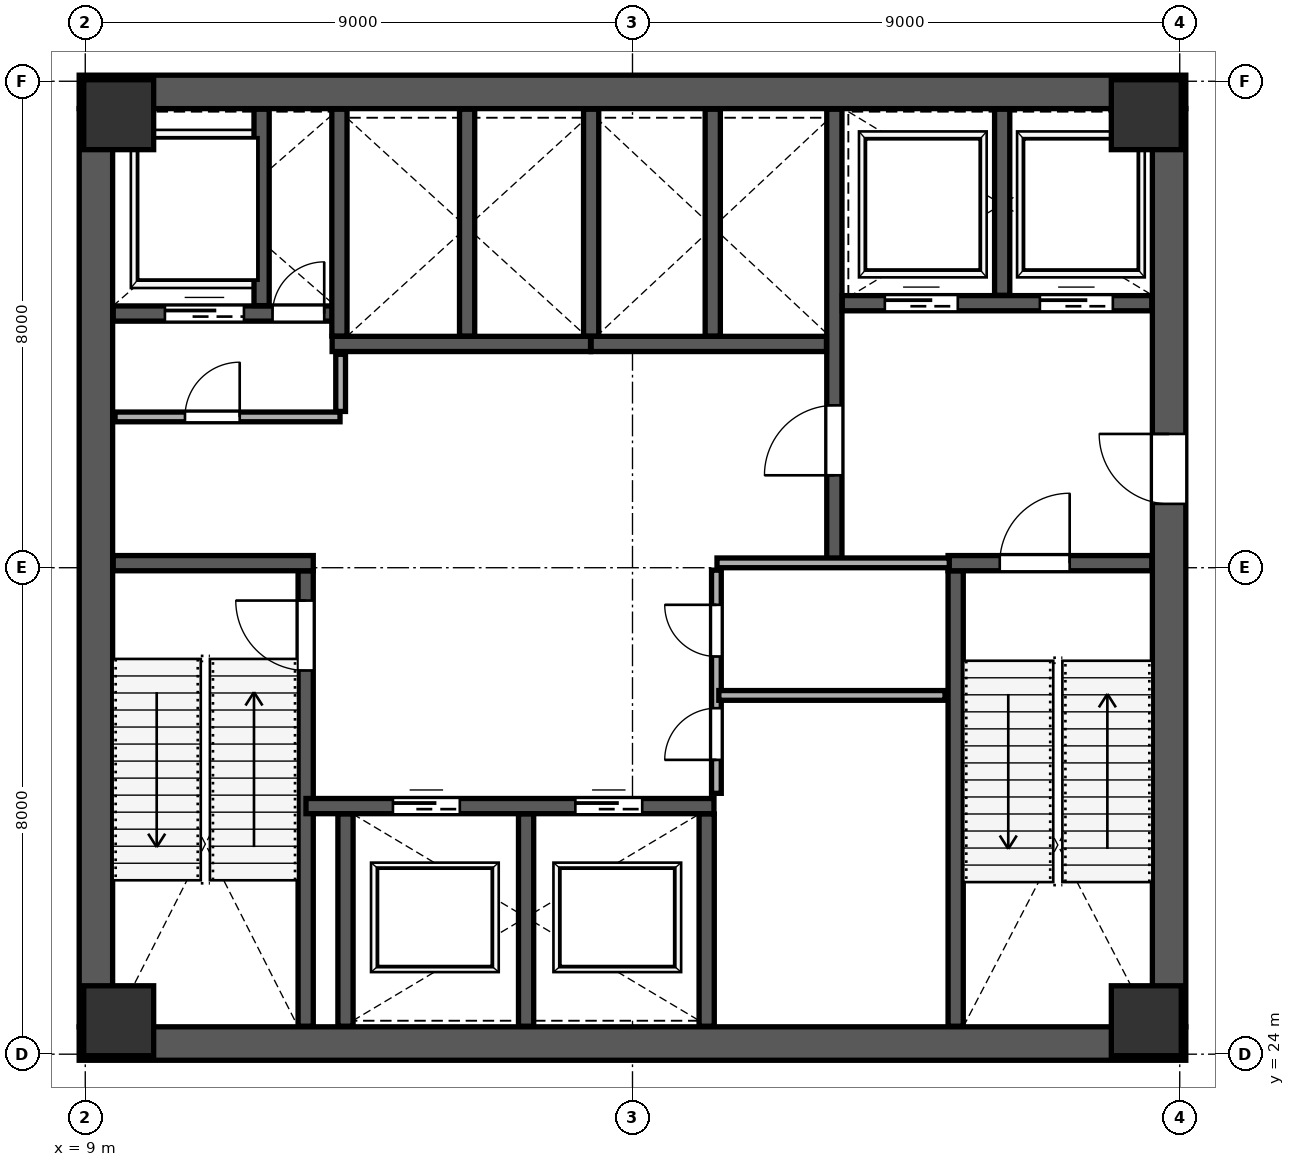
"""IFC4 building model, lengths in metres.
Left out: names, types, materials, properties, quantities, classifications, styles, units other than length and angle.
Written with IfcOpenShell. Run it as: python <this file> out.ifc"""

import sys

from ifc_helpers import new_model, si_unit, direction, frame, frame_2d, origin, origin_2d, place, context, subcontext, project, spatial, rectangle, extrude, source, transform, mapped, element, fill, save


model = new_model("IFC4")
c1 = context("Model", 3, precision=1e-05, world=origin(), true_north=direction((0.0, 1.0)))
c2 = subcontext(c1, "Body", "Model", "MODEL_VIEW")
j1 = project(units=[si_unit("LENGTHUNIT", "METRE"), si_unit("PLANEANGLEUNIT", "RADIAN")], contexts=[c1])
p1 = place(None, origin())
s1 = spatial("IfcSite", under=j1, at=p1, CompositionType="ELEMENT")
p2 = place(p1, origin())
s2 = spatial("IfcBuilding", under=s1, at=p2, CompositionType="ELEMENT")
p3 = place(p2, frame((0.0, 0.0, 52.0)))
s3 = spatial("IfcBuildingStorey", under=s2, at=p3, CompositionType="ELEMENT", Elevation=52.0)
m1 = source(origin(), c2, "Body", "SweptSolid", [
    extrude(rectangle(XDim=1.15, YDim=1.15, at=origin_2d()), origin(), (0.0, 0.0, 1.0), 4.799),
])
for number, where, z_axis, x_axis in (
    (1, (9.55, 24.55, 0.001), (0.0, 0.0, 1.0), (1.0, 0.0, 0.0)),
    (2, (26.45, 24.55, 0.001), (0.0, 0.0, 1.0), (1.0, 0.0, 0.0)),
    (3, (9.55, 39.45, 0.001), (0.0, 0.0, 1.0), (1.0, 0.0, 0.0)),
    (4, (26.45, 39.45, 0.001), (0.0, 0.0, 1.0), (1.0, 0.0, 0.0)),
):
    element("IfcColumn", number, at=place(p3, frame(where, z_axis=z_axis, x_axis=x_axis)), inside=s3, PredefinedType="COLUMN", context=c2, shape_type="MappedRepresentation", body=[
        mapped(m1, transform((0.0, 0.0, 0.0), scale=1.0)),
    ])
p4 = place(p3, frame((9.175, 24.45, 0.0), z_axis=(0.0, 0.0, 1.0), x_axis=(0.0, 1.0, 0.0)))
e5 = element("IfcWall", 5, at=p4, inside=s3, PredefinedType="SHEAR", context=c2, shape_type="SweptSolid", body=[
    extrude(rectangle(XDim=15.1, YDim=0.55, at=frame_2d((7.55, 0.0))), origin(), (0.0, 0.0, 1.0), 4.56),
])
p5 = place(p3, frame((26.825, 24.45, 0.0), z_axis=(0.0, 0.0, 1.0), x_axis=(0.0, 1.0, 0.0)))
e6 = element("IfcWall", 6, at=p5, inside=s3, PredefinedType="SHEAR", context=c2, shape_type="SweptSolid", body=[
    extrude(rectangle(XDim=15.1, YDim=0.55, at=frame_2d((7.55, 0.0))), origin(), (0.0, 0.0, 1.0), 4.56),
])
p6 = place(p5, frame((8.6, 0.0, 0.0)))
e7 = element("IfcOpeningElement", 7, at=p6, cuts=e6, PredefinedType="OPENING", context=c2, shape_type="SweptSolid", body=[
    extrude(rectangle(XDim=1.15, YDim=2.2, at=frame_2d((0.575, 1.1))), frame((0.0, 0.285, 0.0), z_axis=(0.0, -1.0, 0.0), x_axis=(1.0, 0.0, 0.0)), (0.0, 0.0, 1.0), 0.57),
])
for number, where, z_axis, x_axis in (
    (8, (8.9, 24.175, 0.0), (0.0, 0.0, 1.0), (1.0, 0.0, 0.0)),
    (9, (8.9, 39.825, 0.0), (0.0, 0.0, 1.0), (1.0, 0.0, 0.0)),
):
    element("IfcWall", number, at=place(p3, frame(where, z_axis=z_axis, x_axis=x_axis)), inside=s3, PredefinedType="SHEAR", context=c2, shape_type="SweptSolid", body=[
        extrude(rectangle(XDim=18.2, YDim=0.55, at=frame_2d((9.1, 0.0))), origin(), (0.0, 0.0, 1.0), 4.56),
    ])
p7 = place(p3, frame((12.625, 24.46, 0.0), z_axis=(0.0, 0.0, 1.0), x_axis=(0.0, 1.0, 0.0)))
e10 = element("IfcWall", 10, at=p7, inside=s3, PredefinedType="SHEAR", context=c2, shape_type="SweptSolid", body=[
    extrude(rectangle(XDim=7.49, YDim=0.25, at=frame_2d((3.745, 0.0))), origin(), (0.0, 0.0, 1.0), 4.56),
])
p8 = place(p7, frame((5.85, 0.0, 0.0)))
e11 = element("IfcOpeningElement", 11, at=p8, cuts=e10, PredefinedType="OPENING", context=c2, shape_type="SweptSolid", body=[
    extrude(rectangle(XDim=1.15, YDim=2.2, at=frame_2d((0.575, 1.1))), frame((0.0, 0.135, 0.0), z_axis=(0.0, -1.0, 0.0), x_axis=(1.0, 0.0, 0.0)), (0.0, 0.0, 1.0), 0.27),
])
p9 = place(p3, frame((9.46, 32.075, 0.0), z_axis=(0.0, 0.0, 1.0), x_axis=(1.0, 0.0, 0.0)))
e12 = element("IfcWall", 12, at=p9, inside=s3, PredefinedType="SHEAR", context=c2, shape_type="SweptSolid", body=[
    extrude(rectangle(XDim=3.29, YDim=0.25, at=frame_2d((1.645, 0.0))), origin(), (0.0, 0.0, 1.0), 4.56),
])
p10 = place(p3, frame((23.315, 24.46, 0.0), z_axis=(0.0, 0.0, 1.0), x_axis=(0.0, 1.0, 0.0)))
e13 = element("IfcWall", 13, at=p10, inside=s3, PredefinedType="SHEAR", context=c2, shape_type="SweptSolid", body=[
    extrude(rectangle(XDim=7.49, YDim=0.25, at=frame_2d((3.745, 0.0))), origin(), (0.0, 0.0, 1.0), 4.56),
])
p11 = place(p3, frame((23.19, 32.075, 0.0), z_axis=(0.0, 0.0, 1.0), x_axis=(1.0, 0.0, 0.0)))
e14 = element("IfcWall", 14, at=p11, inside=s3, PredefinedType="SHEAR", context=c2, shape_type="SweptSolid", body=[
    extrude(rectangle(XDim=3.35, YDim=0.25, at=frame_2d((1.675, 0.0))), origin(), (0.0, 0.0, 1.0), 4.56),
])
p12 = place(p11, frame((0.85, 0.0, 0.0)))
e15 = element("IfcOpeningElement", 15, at=p12, cuts=e14, PredefinedType="OPENING", context=c2, shape_type="SweptSolid", body=[
    extrude(rectangle(XDim=1.15, YDim=2.2, at=frame_2d((0.575, 1.1))), frame((0.0, 0.135, 0.0), z_axis=(0.0, -1.0, 0.0), x_axis=(1.0, 0.0, 0.0)), (0.0, 0.0, 1.0), 0.27),
])
p13 = place(p3, frame((21.32, 32.12, 0.0), z_axis=(0.0, 0.0, 1.0), x_axis=(0.0, 1.0, 0.0)))
e16 = element("IfcWall", 16, at=p13, inside=s3, PredefinedType="SHEAR", context=c2, shape_type="SweptSolid", body=[
    extrude(rectangle(XDim=7.42, YDim=0.25, at=frame_2d((3.71, 0.0))), origin(), (0.0, 0.0, 1.0), 4.56),
])
p14 = place(p13, frame((1.4, 0.0, 0.0)))
e17 = element("IfcOpeningElement", 17, at=p14, cuts=e16, PredefinedType="OPENING", context=c2, shape_type="SweptSolid", body=[
    extrude(rectangle(XDim=1.15, YDim=2.2, at=frame_2d((0.575, 1.1))), frame((0.0, 0.135, 0.0), z_axis=(0.0, -1.0, 0.0), x_axis=(1.0, 0.0, 0.0)), (0.0, 0.0, 1.0), 0.27),
])
p15 = place(p3, frame((9.46, 36.18, 0.0), z_axis=(0.0, 0.0, 1.0), x_axis=(1.0, 0.0, 0.0)))
e18 = element("IfcWall", 18, at=p15, inside=s3, PredefinedType="SHEAR", context=c2, shape_type="SweptSolid", body=[
    extrude(rectangle(XDim=3.79, YDim=0.25, at=frame_2d((1.895, 0.0))), origin(), (0.0, 0.0, 1.0), 4.56),
])
p16 = place(p15, frame((2.62, 0.0, 0.0)))
e19 = element("IfcOpeningElement", 19, at=p16, cuts=e18, PredefinedType="OPENING", context=c2, shape_type="SweptSolid", body=[
    extrude(rectangle(XDim=0.85, YDim=2.1, at=frame_2d((0.425, 1.05))), frame((0.0, 0.135, 0.0), z_axis=(0.0, -1.0, 0.0), x_axis=(1.0, 0.0, 0.0)), (0.0, 0.0, 1.0), 0.27),
])
p17 = place(p15, frame((0.85, 0.0, 0.0)))
e20 = element("IfcOpeningElement", 20, at=p17, cuts=e18, PredefinedType="OPENING", context=c2, shape_type="SweptSolid", body=[
    extrude(rectangle(XDim=1.3, YDim=2.25, at=frame_2d((0.65, 1.125))), frame((0.0, 0.135, 0.0), z_axis=(0.0, -1.0, 0.0), x_axis=(1.0, 0.0, 0.0)), (0.0, 0.0, 1.0), 0.27),
])
p18 = place(p3, frame((11.9, 36.31, 0.0), z_axis=(0.0, 0.0, 1.0), x_axis=(0.0, 1.0, 0.0)))
e21 = element("IfcWall", 21, at=p18, inside=s3, PredefinedType="SHEAR", context=c2, shape_type="SweptSolid", body=[
    extrude(rectangle(XDim=3.23, YDim=0.25, at=frame_2d((1.615, 0.0))), origin(), (0.0, 0.0, 1.0), 4.56),
])
p19 = place(p3, frame((21.45, 36.35, 0.0), z_axis=(0.0, 0.0, 1.0), x_axis=(1.0, 0.0, 0.0)))
e22 = element("IfcWall", 22, at=p19, inside=s3, PredefinedType="SHEAR", context=c2, shape_type="SweptSolid", body=[
    extrude(rectangle(XDim=5.09, YDim=0.25, at=frame_2d((2.545, 0.0))), origin(), (0.0, 0.0, 1.0), 4.56),
])
p20 = place(p19, frame((0.7, 0.0, 0.0)))
e23 = element("IfcOpeningElement", 23, at=p20, cuts=e22, PredefinedType="OPENING", context=c2, shape_type="SweptSolid", body=[
    extrude(rectangle(XDim=1.2, YDim=2.2, at=frame_2d((0.6, 1.1))), frame((0.0, 0.135, 0.0), z_axis=(0.0, -1.0, 0.0), x_axis=(1.0, 0.0, 0.0)), (0.0, 0.0, 1.0), 0.27),
])
p21 = place(p19, frame((3.25, 0.0, 0.0)))
e24 = element("IfcOpeningElement", 24, at=p21, cuts=e22, PredefinedType="OPENING", context=c2, shape_type="SweptSolid", body=[
    extrude(rectangle(XDim=1.2, YDim=2.2, at=frame_2d((0.6, 1.1))), frame((0.0, 0.135, 0.0), z_axis=(0.0, -1.0, 0.0), x_axis=(1.0, 0.0, 0.0)), (0.0, 0.0, 1.0), 0.27),
])
p22 = place(p3, frame((24.08, 36.48, 0.0), z_axis=(0.0, 0.0, 1.0), x_axis=(0.0, 1.0, 0.0)))
e25 = element("IfcWall", 25, at=p22, inside=s3, PredefinedType="SHEAR", context=c2, shape_type="SweptSolid", body=[
    extrude(rectangle(XDim=3.06, YDim=0.25, at=frame_2d((1.53, 0.0))), origin(), (0.0, 0.0, 1.0), 4.56),
])
p23 = place(p3, frame((12.63, 28.08, 0.0), z_axis=(0.0, 0.0, 1.0), x_axis=(1.0, 0.0, 0.0)))
e26 = element("IfcWall", 26, at=p23, inside=s3, PredefinedType="SHEAR", context=c2, shape_type="SweptSolid", body=[
    extrude(rectangle(XDim=6.71, YDim=0.25, at=frame_2d((3.355, 0.0))), origin(), (0.0, 0.0, 1.0), 4.56),
])
p24 = place(p23, frame((1.43, 0.0, 0.0)))
e27 = element("IfcOpeningElement", 27, at=p24, cuts=e26, PredefinedType="OPENING", context=c2, shape_type="SweptSolid", body=[
    extrude(rectangle(XDim=1.1, YDim=2.2, at=frame_2d((0.55, 1.1))), frame((0.0, 0.135, 0.0), z_axis=(0.0, -1.0, 0.0), x_axis=(1.0, 0.0, 0.0)), (0.0, 0.0, 1.0), 0.27),
])
p25 = place(p23, frame((4.43, 0.0, 0.0)))
e28 = element("IfcOpeningElement", 28, at=p25, cuts=e26, PredefinedType="OPENING", context=c2, shape_type="SweptSolid", body=[
    extrude(rectangle(XDim=1.1, YDim=2.2, at=frame_2d((0.55, 1.1))), frame((0.0, 0.135, 0.0), z_axis=(0.0, -1.0, 0.0), x_axis=(1.0, 0.0, 0.0)), (0.0, 0.0, 1.0), 0.27),
])
for number, where, z_axis, x_axis in (
    (29, (13.28, 24.46, 0.0), (0.0, 0.0, 1.0), (0.0, 1.0, 0.0)),
    (30, (16.25, 24.46, 0.0), (0.0, 0.0, 1.0), (0.0, 1.0, 0.0)),
    (31, (19.22, 24.46, 0.0), (0.0, 0.0, 1.0), (0.0, 1.0, 0.0)),
):
    element("IfcWall", number, at=place(p3, frame(where, z_axis=z_axis, x_axis=x_axis)), inside=s3, PredefinedType="SHEAR", context=c2, shape_type="SweptSolid", body=[
        extrude(rectangle(XDim=3.49, YDim=0.25, at=frame_2d((1.745, 0.0))), origin(), (0.0, 0.0, 1.0), 4.56),
    ])
p26 = place(p3, frame((13.06, 35.68, 0.0), z_axis=(0.0, 0.0, 1.0), x_axis=(1.0, 0.0, 0.0)))
e32 = element("IfcWall", 32, at=p26, inside=s3, PredefinedType="SHEAR", context=c2, shape_type="SweptSolid", body=[
    extrude(rectangle(XDim=4.25, YDim=0.25, at=frame_2d((2.125, 0.0))), origin(), (0.0, 0.0, 1.0), 4.56),
])
for number, where, z_axis, x_axis in (
    (33, (13.18, 35.81, 0.0), (0.0, 0.0, 1.0), (0.0, 1.0, 0.0)),
    (34, (15.28, 35.81, 0.0), (0.0, 0.0, 1.0), (0.0, 1.0, 0.0)),
):
    element("IfcWall", number, at=place(p3, frame(where, z_axis=z_axis, x_axis=x_axis)), inside=s3, PredefinedType="SHEAR", context=c2, shape_type="SweptSolid", body=[
        extrude(rectangle(XDim=3.73, YDim=0.25, at=frame_2d((1.865, 0.0))), origin(), (0.0, 0.0, 1.0), 4.56),
    ])
p27 = place(p3, frame((17.32, 35.68, 0.0), z_axis=(0.0, 0.0, 1.0), x_axis=(1.0, 0.0, 0.0)))
e35 = element("IfcWall", 35, at=p27, inside=s3, PredefinedType="SHEAR", context=c2, shape_type="SweptSolid", body=[
    extrude(rectangle(XDim=3.87, YDim=0.25, at=frame_2d((1.935, 0.0))), origin(), (0.0, 0.0, 1.0), 4.56),
])
for number, where, z_axis, x_axis in (
    (36, (17.32, 35.81, 0.0), (0.0, 0.0, 1.0), (0.0, 1.0, 0.0)),
    (37, (19.32, 35.81, 0.0), (0.0, 0.0, 1.0), (0.0, 1.0, 0.0)),
):
    element("IfcWall", number, at=place(p3, frame(where, z_axis=z_axis, x_axis=x_axis)), inside=s3, PredefinedType="SHEAR", context=c2, shape_type="SweptSolid", body=[
        extrude(rectangle(XDim=3.73, YDim=0.25, at=frame_2d((1.865, 0.0))), origin(), (0.0, 0.0, 1.0), 4.56),
    ])
p28 = place(p3, frame((9.49, 34.48, 0.0), z_axis=(0.0, 0.0, 1.0), x_axis=(1.0, 0.0, 0.0)))
e38 = element("IfcWall", 38, at=p28, inside=s3, PredefinedType="PARTITIONING", context=c2, shape_type="SweptSolid", body=[
    extrude(rectangle(XDim=3.7, YDim=0.16, at=frame_2d((1.85, 0.0))), origin(), (0.0, 0.0, 1.0), 4.56),
])
p29 = place(p28, frame((1.15, 0.0, 0.0)))
e39 = element("IfcOpeningElement", 39, at=p29, cuts=e38, PredefinedType="OPENING", context=c2, shape_type="SweptSolid", body=[
    extrude(rectangle(XDim=0.9, YDim=2.15, at=frame_2d((0.45, 1.075))), frame((0.0, 0.09, 0.0), z_axis=(0.0, -1.0, 0.0), x_axis=(1.0, 0.0, 0.0)), (0.0, 0.0, 1.0), 0.18),
])
p30 = place(p3, frame((13.2, 34.57, 0.0), z_axis=(0.0, 0.0, 1.0), x_axis=(0.0, 1.0, 0.0)))
e40 = element("IfcWall", 40, at=p30, inside=s3, PredefinedType="PARTITIONING", context=c2, shape_type="SweptSolid", body=[
    extrude(rectangle(XDim=0.94, YDim=0.16, at=frame_2d((0.47, 0.0))), origin(), (0.0, 0.0, 1.0), 4.56),
])
p31 = place(p3, frame((19.39, 32.08, 0.0), z_axis=(0.0, 0.0, 1.0), x_axis=(1.0, 0.0, 0.0)))
e41 = element("IfcWall", 41, at=p31, inside=s3, PredefinedType="PARTITIONING", context=c2, shape_type="SweptSolid", body=[
    extrude(rectangle(XDim=3.82, YDim=0.16, at=frame_2d((1.91, 0.0))), origin(), (0.0, 0.0, 1.0), 4.56),
])
p32 = place(p3, frame((19.38, 28.29, 0.0), z_axis=(0.0, 0.0, 1.0), x_axis=(0.0, 1.0, 0.0)))
e42 = element("IfcWall", 42, at=p32, inside=s3, PredefinedType="PARTITIONING", context=c2, shape_type="SweptSolid", body=[
    extrude(rectangle(XDim=3.67, YDim=0.16, at=frame_2d((1.835, 0.0))), origin(), (0.0, 0.0, 1.0), 4.56),
])
p33 = place(p32, frame((0.55, 0.0, 0.0)))
e43 = element("IfcOpeningElement", 43, at=p33, cuts=e42, PredefinedType="OPENING", context=c2, shape_type="SweptSolid", body=[
    extrude(rectangle(XDim=0.85, YDim=2.1, at=frame_2d((0.425, 1.05))), frame((0.0, 0.09, 0.0), z_axis=(0.0, -1.0, 0.0), x_axis=(1.0, 0.0, 0.0)), (0.0, 0.0, 1.0), 0.18),
])
p34 = place(p32, frame((2.25, 0.0, 0.0)))
e44 = element("IfcOpeningElement", 44, at=p34, cuts=e42, PredefinedType="OPENING", context=c2, shape_type="SweptSolid", body=[
    extrude(rectangle(XDim=0.85, YDim=2.1, at=frame_2d((0.425, 1.05))), frame((0.0, 0.09, 0.0), z_axis=(0.0, -1.0, 0.0), x_axis=(1.0, 0.0, 0.0)), (0.0, 0.0, 1.0), 0.18),
])
p35 = place(p3, frame((19.42, 29.9, 0.0), z_axis=(0.0, 0.0, 1.0), x_axis=(1.0, 0.0, 0.0)))
e45 = element("IfcWall", 45, at=p35, inside=s3, PredefinedType="PARTITIONING", context=c2, shape_type="SweptSolid", body=[
    extrude(rectangle(XDim=3.72, YDim=0.16, at=frame_2d((1.86, 0.0))), origin(), (0.0, 0.0, 1.0), 4.56),
])
m2 = source(origin(), c2, "Body", "SweptSolid", [
    extrude(rectangle(XDim=1.15, YDim=2.2, at=frame_2d((0.575, 1.1))), frame((0.0, 0.025, 0.0), z_axis=(0.0, -1.0, 0.0), x_axis=(1.0, 0.0, 0.0)), (0.0, 0.0, 1.0), 0.05),
])
p36 = place(p8, origin())
e46 = element("IfcDoor", 46, at=p36, inside=s3, OperationType="SINGLE_SWING_RIGHT", PredefinedType="DOOR", context=c2, shape_type="MappedRepresentation", body=[
    mapped(m2, transform((0.0, 0.0, 0.0), scale=1.0)),
])
fill(e11, e46)
m3 = source(origin(), c2, "Body", "SweptSolid", [
    extrude(rectangle(XDim=1.15, YDim=2.2, at=frame_2d((0.575, 1.1))), frame((0.0, 0.025, 0.0), z_axis=(0.0, -1.0, 0.0), x_axis=(1.0, 0.0, 0.0)), (0.0, 0.0, 1.0), 0.05),
])
p37 = place(p14, origin())
e47 = element("IfcDoor", 47, at=p37, inside=s3, OperationType="SINGLE_SWING_LEFT", PredefinedType="DOOR", context=c2, shape_type="MappedRepresentation", body=[
    mapped(m3, transform((0.0, 0.0, 0.0), scale=1.0)),
])
fill(e17, e47)
p38 = place(p12, origin())
e48 = element("IfcDoor", 48, at=p38, inside=s3, OperationType="SINGLE_SWING_RIGHT", PredefinedType="DOOR", context=c2, shape_type="MappedRepresentation", body=[
    mapped(m2, transform((0.0, 0.0, 0.0), scale=1.0)),
])
fill(e15, e48)
p39 = place(p6, origin())
e49 = element("IfcDoor", 49, at=p39, inside=s3, OperationType="SINGLE_SWING_RIGHT", PredefinedType="DOOR", context=c2, shape_type="MappedRepresentation", body=[
    mapped(m3, transform((0.0, 0.0, 0.0), scale=1.0)),
])
fill(e7, e49)
m4 = source(origin(), c2, "Body", "SweptSolid", [
    extrude(rectangle(XDim=0.85, YDim=2.1, at=frame_2d((0.425, 1.05))), frame((0.0, 0.025, 0.0), z_axis=(0.0, -1.0, 0.0), x_axis=(1.0, 0.0, 0.0)), (0.0, 0.0, 1.0), 0.05),
])
p40 = place(p16, origin())
e50 = element("IfcDoor", 50, at=p40, inside=s3, OperationType="SINGLE_SWING_RIGHT", PredefinedType="DOOR", context=c2, shape_type="MappedRepresentation", body=[
    mapped(m4, transform((0.0, 0.0, 0.0), scale=1.0)),
])
fill(e19, e50)
m5 = source(origin(), c2, "Body", "SweptSolid", [
    extrude(rectangle(XDim=1.1, YDim=2.2, at=frame_2d((0.55, 1.1))), frame((0.0, 0.025, 0.0), z_axis=(0.0, -1.0, 0.0), x_axis=(1.0, 0.0, 0.0)), (0.0, 0.0, 1.0), 0.05),
])
p41 = place(p24, origin())
e51 = element("IfcDoor", 51, at=p41, inside=s3, OperationType="SLIDING_TO_LEFT", PredefinedType="DOOR", context=c2, shape_type="MappedRepresentation", body=[
    mapped(m5, transform((0.0, 0.0, 0.0), scale=1.0)),
])
fill(e27, e51)
p42 = place(p25, origin())
e52 = element("IfcDoor", 52, at=p42, inside=s3, OperationType="SLIDING_TO_RIGHT", PredefinedType="DOOR", context=c2, shape_type="MappedRepresentation", body=[
    mapped(m5, transform((0.0, 0.0, 0.0), scale=1.0)),
])
fill(e28, e52)
m6 = source(origin(), c2, "Body", "SweptSolid", [
    extrude(rectangle(XDim=1.2, YDim=2.2, at=frame_2d((0.6, 1.1))), frame((0.0, 0.025, 0.0), z_axis=(0.0, -1.0, 0.0), x_axis=(1.0, 0.0, 0.0)), (0.0, 0.0, 1.0), 0.05),
])
p43 = place(p20, origin())
e53 = element("IfcDoor", 53, at=p43, inside=s3, OperationType="SLIDING_TO_LEFT", PredefinedType="DOOR", context=c2, shape_type="MappedRepresentation", body=[
    mapped(m6, transform((0.0, 0.0, 0.0), scale=1.0)),
])
fill(e23, e53)
p44 = place(p21, origin())
e54 = element("IfcDoor", 54, at=p44, inside=s3, OperationType="SLIDING_TO_RIGHT", PredefinedType="DOOR", context=c2, shape_type="MappedRepresentation", body=[
    mapped(m6, transform((0.0, 0.0, 0.0), scale=1.0)),
])
fill(e24, e54)
m7 = source(origin(), c2, "Body", "SweptSolid", [
    extrude(rectangle(XDim=1.3, YDim=2.25, at=frame_2d((0.65, 1.125))), frame((0.0, 0.025, 0.0), z_axis=(0.0, -1.0, 0.0), x_axis=(1.0, 0.0, 0.0)), (0.0, 0.0, 1.0), 0.05),
])
p45 = place(p17, origin())
e55 = element("IfcDoor", 55, at=p45, inside=s3, OperationType="SLIDING_TO_LEFT", PredefinedType="DOOR", context=c2, shape_type="MappedRepresentation", body=[
    mapped(m7, transform((0.0, 0.0, 0.0), scale=1.0)),
])
fill(e20, e55)
m8 = source(origin(), c2, "Body", "SweptSolid", [
    extrude(rectangle(XDim=0.9, YDim=2.15, at=frame_2d((0.45, 1.075))), frame((0.0, 0.025, 0.0), z_axis=(0.0, -1.0, 0.0), x_axis=(1.0, 0.0, 0.0)), (0.0, 0.0, 1.0), 0.05),
])
p46 = place(p29, origin())
e56 = element("IfcDoor", 56, at=p46, inside=s3, OperationType="SINGLE_SWING_RIGHT", PredefinedType="DOOR", context=c2, shape_type="MappedRepresentation", body=[
    mapped(m8, transform((0.0, 0.0, 0.0), scale=1.0)),
])
fill(e39, e56)
p47 = place(p33, origin())
e57 = element("IfcDoor", 57, at=p47, inside=s3, OperationType="SINGLE_SWING_LEFT", PredefinedType="DOOR", context=c2, shape_type="MappedRepresentation", body=[
    mapped(m4, transform((0.0, 0.0, 0.0), scale=1.0)),
])
fill(e43, e57)
p48 = place(p34, origin())
e58 = element("IfcDoor", 58, at=p48, inside=s3, OperationType="SINGLE_SWING_RIGHT", PredefinedType="DOOR", context=c2, shape_type="MappedRepresentation", body=[
    mapped(m4, transform((0.0, 0.0, 0.0), scale=1.0)),
])
fill(e44, e58)
save(model, sys.argv[1])
